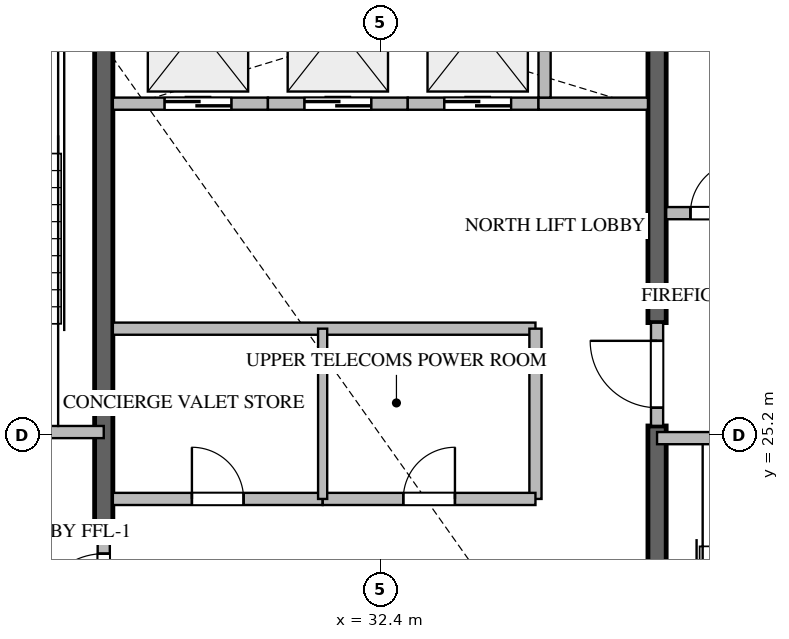
"""IFC4 building model, lengths in metres.
Left out: names, types, materials, properties, quantities, classifications, styles, units other than length and angle.
Written with IfcOpenShell. Run it as: python <this file> out.ifc"""

import sys

from ifc_helpers import new_model, si_unit, direction, frame, frame_2d, origin, place, context, subcontext, project, spatial, rectangle, extrude, source, transform, mapped, element, fill, save


model = new_model("IFC4")
c1 = context("Model", 3, precision=1e-05, world=origin(), true_north=direction((0.0, 1.0)))
c2 = subcontext(c1, "Body", "Model", "MODEL_VIEW")
j1 = project(units=[si_unit("LENGTHUNIT", "METRE"), si_unit("PLANEANGLEUNIT", "RADIAN")], contexts=[c1])
p1 = place(None, origin())
s1 = spatial("IfcSite", under=j1, at=p1, CompositionType="ELEMENT")
p2 = place(p1, origin())
s2 = spatial("IfcBuilding", under=s1, at=p2, CompositionType="ELEMENT")
p3 = place(p2, frame((0.0, 0.0, 225.85)))
s3 = spatial("IfcBuildingStorey", under=s2, at=p3, CompositionType="ELEMENT", Elevation=225.85)
p4 = place(p3, frame((27.85, 23.55, -0.26), z_axis=(0.0, 0.0, 1.0), x_axis=(0.0, 1.0, 0.0)))
e1 = element("IfcWall", 1, at=p4, inside=s3, PredefinedType="SHEAR", context=c2, shape_type="SweptSolid", body=[
    extrude(rectangle(XDim=9.875, YDim=0.3, at=frame_2d((4.938, 0.0))), origin(), (0.0, 0.0, 1.0), 3.848),
])
p5 = place(p3, frame((36.95, 16.975, -0.26), z_axis=(0.0, 0.0, 1.0), x_axis=(0.0, 1.0, 0.0)))
e2 = element("IfcWall", 2, at=p5, inside=s3, PredefinedType="SHEAR", context=c2, shape_type="SweptSolid", body=[
    extrude(rectangle(XDim=8.375, YDim=0.3, at=frame_2d((4.188, 0.0))), origin(), (0.0, 0.0, 1.0), 3.848),
])
p6 = place(p3, frame((36.95, 27.05, -0.26), z_axis=(0.0, 0.0, 1.0), x_axis=(0.0, 1.0, 0.0)))
e3 = element("IfcWall", 3, at=p6, inside=s3, PredefinedType="SHEAR", context=c2, shape_type="SweptSolid", body=[
    extrude(rectangle(XDim=6.375, YDim=0.3, at=frame_2d((3.188, 0.0))), origin(), (0.0, 0.0, 1.0), 3.848),
])
p7 = place(p3, frame((23.4, 25.25, 0.0), z_axis=(0.0, 0.0, 1.0), x_axis=(1.0, 0.0, 0.0)))
e4 = element("IfcWall", 4, at=p7, inside=s3, PredefinedType="STANDARD", context=c2, shape_type="SweptSolid", body=[
    extrude(rectangle(XDim=4.45, YDim=0.2, at=frame_2d((2.225, 0.0))), origin(), (0.0, 0.0, 1.0), 3.59),
])
p8 = place(p7, frame((1.65, 0.0, 0.0)))
e5 = element("IfcOpeningElement", 5, at=p8, cuts=e4, PredefinedType="OPENING", context=c2, shape_type="SweptSolid", body=[
    extrude(rectangle(XDim=1.1, YDim=2.15, at=frame_2d((0.55, 1.075))), frame((0.0, 0.11, 0.0), z_axis=(0.0, -1.0, 0.0), x_axis=(1.0, 0.0, 0.0)), (0.0, 0.0, 1.0), 0.22),
])
p9 = place(p3, frame((36.95, 25.15, 0.0), z_axis=(0.0, 0.0, 1.0), x_axis=(1.0, 0.0, 0.0)))
e6 = element("IfcWall", 6, at=p9, inside=s3, PredefinedType="STANDARD", context=c2, shape_type="SweptSolid", body=[
    extrude(rectangle(XDim=4.45, YDim=0.2, at=frame_2d((2.225, 0.0))), origin(), (0.0, 0.0, 1.0), 3.59),
])
p10 = place(p9, frame((1.65, 0.0, 0.0)))
e7 = element("IfcOpeningElement", 7, at=p10, cuts=e6, PredefinedType="OPENING", context=c2, shape_type="SweptSolid", body=[
    extrude(rectangle(XDim=1.1, YDim=2.15, at=frame_2d((0.55, 1.075))), frame((0.0, 0.11, 0.0), z_axis=(0.0, -1.0, 0.0), x_axis=(1.0, 0.0, 0.0)), (0.0, 0.0, 1.0), 0.22),
])
p11 = place(p3, frame((28.0, 30.65, 0.0), z_axis=(0.0, 0.0, 1.0), x_axis=(1.0, 0.0, 0.0)))
e8 = element("IfcWall", 8, at=p11, inside=s3, PredefinedType="STANDARD", context=c2, shape_type="SweptSolid", body=[
    extrude(rectangle(XDim=2.55, YDim=0.2, at=frame_2d((1.275, 0.0))), origin(), (0.0, 0.0, 1.0), 3.59),
])
p12 = place(p11, frame((0.85, 0.0, 0.0)))
e9 = element("IfcOpeningElement", 9, at=p12, cuts=e8, PredefinedType="OPENING", context=c2, shape_type="SweptSolid", body=[
    extrude(rectangle(XDim=1.1, YDim=2.2, at=frame_2d((0.55, 1.1))), frame((0.0, 0.11, 0.0), z_axis=(0.0, -1.0, 0.0), x_axis=(1.0, 0.0, 0.0)), (0.0, 0.0, 1.0), 0.22),
])
p13 = place(p3, frame((30.55, 30.65, 0.0), z_axis=(0.0, 0.0, 1.0), x_axis=(1.0, 0.0, 0.0)))
e10 = element("IfcWall", 10, at=p13, inside=s3, PredefinedType="STANDARD", context=c2, shape_type="SweptSolid", body=[
    extrude(rectangle(XDim=2.3, YDim=0.2, at=frame_2d((1.15, 0.0))), origin(), (0.0, 0.0, 1.0), 3.59),
])
p14 = place(p13, frame((0.6, 0.0, 0.0)))
e11 = element("IfcOpeningElement", 11, at=p14, cuts=e10, PredefinedType="OPENING", context=c2, shape_type="SweptSolid", body=[
    extrude(rectangle(XDim=1.1, YDim=2.2, at=frame_2d((0.55, 1.1))), frame((0.0, 0.11, 0.0), z_axis=(0.0, -1.0, 0.0), x_axis=(1.0, 0.0, 0.0)), (0.0, 0.0, 1.0), 0.22),
])
p15 = place(p3, frame((32.85, 30.65, 0.0), z_axis=(0.0, 0.0, 1.0), x_axis=(1.0, 0.0, 0.0)))
e12 = element("IfcWall", 12, at=p15, inside=s3, PredefinedType="STANDARD", context=c2, shape_type="SweptSolid", body=[
    extrude(rectangle(XDim=2.15, YDim=0.2, at=frame_2d((1.075, 0.0))), origin(), (0.0, 0.0, 1.0), 3.59),
])
p16 = place(p15, frame((0.6, 0.0, 0.0)))
e13 = element("IfcOpeningElement", 13, at=p16, cuts=e12, PredefinedType="OPENING", context=c2, shape_type="SweptSolid", body=[
    extrude(rectangle(XDim=1.1, YDim=2.2, at=frame_2d((0.55, 1.1))), frame((0.0, 0.11, 0.0), z_axis=(0.0, -1.0, 0.0), x_axis=(1.0, 0.0, 0.0)), (0.0, 0.0, 1.0), 0.22),
])
p17 = place(p3, frame((35.0, 30.65, 0.0), z_axis=(0.0, 0.0, 1.0), x_axis=(1.0, 0.0, 0.0)))
e14 = element("IfcWall", 14, at=p17, inside=s3, PredefinedType="STANDARD", context=c2, shape_type="SweptSolid", body=[
    extrude(rectangle(XDim=1.8, YDim=0.2, at=frame_2d((0.9, 0.0))), origin(), (0.0, 0.0, 1.0), 3.59),
])
p18 = place(p3, frame((35.1, 30.75, 0.0), z_axis=(0.0, 0.0, 1.0), x_axis=(0.0, 1.0, 0.0)))
e15 = element("IfcWall", 15, at=p18, inside=s3, PredefinedType="STANDARD", context=c2, shape_type="SweptSolid", body=[
    extrude(rectangle(XDim=2.675, YDim=0.2, at=frame_2d((1.337, 0.0))), origin(), (0.0, 0.0, 1.0), 3.59),
])
p19 = place(p3, frame((37.1, 28.85, 0.0), z_axis=(0.0, 0.0, 1.0), x_axis=(1.0, 0.0, 0.0)))
e16 = element("IfcWall", 16, at=p19, inside=s3, PredefinedType="STANDARD", context=c2, shape_type="SweptSolid", body=[
    extrude(rectangle(XDim=1.648, YDim=0.2, at=frame_2d((0.824, 0.0))), origin(), (0.0, 0.0, 1.0), 3.59),
])
p20 = place(p19, frame((0.399, 0.0, 0.0)))
e17 = element("IfcOpeningElement", 17, at=p20, cuts=e16, PredefinedType="OPENING", context=c2, shape_type="SweptSolid", body=[
    extrude(rectangle(XDim=0.85, YDim=2.1, at=frame_2d((0.425, 1.05))), frame((0.0, 0.11, 0.0), z_axis=(0.0, -1.0, 0.0), x_axis=(1.0, 0.0, 0.0)), (0.0, 0.0, 1.0), 0.22),
])
p21 = place(p3, frame((27.85, 21.852, 0.0), z_axis=(0.0, 0.0, 1.0), x_axis=(0.0, 1.0, 0.0)))
e18 = element("IfcWall", 18, at=p21, inside=s3, PredefinedType="STANDARD", context=c2, shape_type="SweptSolid", body=[
    extrude(rectangle(XDim=1.696, YDim=0.2, at=frame_2d((0.848, 0.0))), origin(), (0.0, 0.0, 1.0), 3.59),
])
p22 = place(p21, frame((0.298, 0.0, 0.0)))
e19 = element("IfcOpeningElement", 19, at=p22, cuts=e18, PredefinedType="OPENING", context=c2, shape_type="SweptSolid", body=[
    extrude(rectangle(XDim=1.1, YDim=2.15, at=frame_2d((0.55, 1.075))), frame((0.0, 0.11, 0.0), z_axis=(0.0, -1.0, 0.0), x_axis=(1.0, 0.0, 0.0)), (0.0, 0.0, 1.0), 0.22),
])
p23 = place(p3, frame((36.95, 25.352, 0.0), z_axis=(0.0, 0.0, 1.0), x_axis=(0.0, 1.0, 0.0)))
e20 = element("IfcWall", 20, at=p23, inside=s3, PredefinedType="STANDARD", context=c2, shape_type="SweptSolid", body=[
    extrude(rectangle(XDim=1.696, YDim=0.2, at=frame_2d((0.848, 0.0))), origin(), (0.0, 0.0, 1.0), 3.59),
])
p24 = place(p23, frame((0.298, 0.0, 0.0)))
e21 = element("IfcOpeningElement", 21, at=p24, cuts=e20, PredefinedType="OPENING", context=c2, shape_type="SweptSolid", body=[
    extrude(rectangle(XDim=1.1, YDim=2.15, at=frame_2d((0.55, 1.075))), frame((0.0, 0.11, 0.0), z_axis=(0.0, -1.0, 0.0), x_axis=(1.0, 0.0, 0.0)), (0.0, 0.0, 1.0), 0.22),
])
p25 = place(p3, frame((28.0, 26.95, 0.0), z_axis=(0.0, 0.0, 1.0), x_axis=(1.0, 0.0, 0.0)))
e22 = element("IfcWall", 22, at=p25, inside=s3, PredefinedType="STANDARD", context=c2, shape_type="SweptSolid", body=[
    extrude(rectangle(XDim=6.95, YDim=0.2, at=frame_2d((3.475, 0.0))), origin(), (0.0, 0.0, 1.0), 3.59),
])
p26 = place(p3, frame((34.95, 24.15, 0.0), z_axis=(0.0, 0.0, 1.0), x_axis=(0.0, 1.0, 0.0)))
e23 = element("IfcWall", 23, at=p26, inside=s3, PredefinedType="STANDARD", context=c2, shape_type="SweptSolid", body=[
    extrude(rectangle(XDim=2.8, YDim=0.2, at=frame_2d((1.4, 0.0))), origin(), (0.0, 0.0, 1.0), 3.59),
])
p27 = place(p3, frame((28.0, 24.15, 0.0), z_axis=(0.0, 0.0, 1.0), x_axis=(1.0, 0.0, 0.0)))
e24 = element("IfcWall", 24, at=p27, inside=s3, PredefinedType="STANDARD", context=c2, shape_type="SweptSolid", body=[
    extrude(rectangle(XDim=3.45, YDim=0.2, at=frame_2d((1.725, 0.0))), origin(), (0.0, 0.0, 1.0), 3.59),
])
p28 = place(p27, frame((1.3, 0.0, 0.0)))
e25 = element("IfcOpeningElement", 25, at=p28, cuts=e24, PredefinedType="OPENING", context=c2, shape_type="SweptSolid", body=[
    extrude(rectangle(XDim=0.85, YDim=2.1, at=frame_2d((0.425, 1.05))), frame((0.0, 0.11, 0.0), z_axis=(0.0, -1.0, 0.0), x_axis=(1.0, 0.0, 0.0)), (0.0, 0.0, 1.0), 0.22),
])
p29 = place(p3, frame((31.452, 24.15, 0.0), z_axis=(0.0, 0.0, 1.0), x_axis=(1.0, 0.0, 0.0)))
e26 = element("IfcWall", 26, at=p29, inside=s3, PredefinedType="STANDARD", context=c2, shape_type="SweptSolid", body=[
    extrude(rectangle(XDim=3.498, YDim=0.2, at=frame_2d((1.749, 0.0))), origin(), (0.0, 0.0, 1.0), 3.59),
])
p30 = place(p29, frame((1.324, 0.0, 0.0)))
e27 = element("IfcOpeningElement", 27, at=p30, cuts=e26, PredefinedType="OPENING", context=c2, shape_type="SweptSolid", body=[
    extrude(rectangle(XDim=0.85, YDim=2.1, at=frame_2d((0.425, 1.05))), frame((0.0, 0.11, 0.0), z_axis=(0.0, -1.0, 0.0), x_axis=(1.0, 0.0, 0.0)), (0.0, 0.0, 1.0), 0.22),
])
p31 = place(p3, frame((31.45, 24.15, 0.0), z_axis=(0.0, 0.0, 1.0), x_axis=(0.0, 1.0, 0.0)))
e28 = element("IfcWall", 28, at=p31, inside=s3, PredefinedType="PARTITIONING", context=c2, shape_type="SweptSolid", body=[
    extrude(rectangle(XDim=2.8, YDim=0.15, at=frame_2d((1.4, 0.0))), origin(), (0.0, 0.0, 1.0), 3.59),
])
m1 = source(origin(), c2, "Body", "SweptSolid", [
    extrude(rectangle(XDim=1.1, YDim=2.2, at=frame_2d((0.55, 1.1))), frame((0.0, 0.025, 0.0), z_axis=(0.0, -1.0, 0.0), x_axis=(1.0, 0.0, 0.0)), (0.0, 0.0, 1.0), 0.05),
])
p32 = place(p12, origin())
e29 = element("IfcDoor", 29, at=p32, inside=s3, OperationType="DOUBLE_DOOR_SLIDING", PredefinedType="DOOR", context=c2, shape_type="MappedRepresentation", body=[
    mapped(m1, transform((0.0, 0.0, 0.0), scale=1.0)),
])
fill(e9, e29)
p33 = place(p14, origin())
e30 = element("IfcDoor", 30, at=p33, inside=s3, OperationType="DOUBLE_DOOR_SLIDING", PredefinedType="DOOR", context=c2, shape_type="MappedRepresentation", body=[
    mapped(m1, transform((0.0, 0.0, 0.0), scale=1.0)),
])
fill(e11, e30)
p34 = place(p16, origin())
e31 = element("IfcDoor", 31, at=p34, inside=s3, OperationType="DOUBLE_DOOR_SLIDING", PredefinedType="DOOR", context=c2, shape_type="MappedRepresentation", body=[
    mapped(m1, transform((0.0, 0.0, 0.0), scale=1.0)),
])
fill(e13, e31)
m2 = source(origin(), c2, "Body", "SweptSolid", [
    extrude(rectangle(XDim=0.85, YDim=2.1, at=frame_2d((0.425, 1.05))), frame((0.0, 0.025, 0.0), z_axis=(0.0, -1.0, 0.0), x_axis=(1.0, 0.0, 0.0)), (0.0, 0.0, 1.0), 0.05),
])
p35 = place(p20, origin())
e32 = element("IfcDoor", 32, at=p35, inside=s3, OperationType="SINGLE_SWING_RIGHT", PredefinedType="DOOR", context=c2, shape_type="MappedRepresentation", body=[
    mapped(m2, transform((0.0, 0.0, 0.0), scale=1.0)),
])
fill(e17, e32)
m3 = source(origin(), c2, "Body", "SweptSolid", [
    extrude(rectangle(XDim=1.1, YDim=2.15, at=frame_2d((0.55, 1.075))), frame((0.0, 0.025, 0.0), z_axis=(0.0, -1.0, 0.0), x_axis=(1.0, 0.0, 0.0)), (0.0, 0.0, 1.0), 0.05),
])
p36 = place(p22, origin())
e33 = element("IfcDoor", 33, at=p36, inside=s3, OperationType="SINGLE_SWING_LEFT", PredefinedType="DOOR", context=c2, shape_type="MappedRepresentation", body=[
    mapped(m3, transform((0.0, 0.0, 0.0), scale=1.0)),
])
fill(e19, e33)
p37 = place(p24, origin())
e34 = element("IfcDoor", 34, at=p37, inside=s3, OperationType="SINGLE_SWING_RIGHT", PredefinedType="DOOR", context=c2, shape_type="MappedRepresentation", body=[
    mapped(m3, transform((0.0, 0.0, 0.0), scale=1.0)),
])
fill(e21, e34)
p38 = place(p28, origin())
e35 = element("IfcDoor", 35, at=p38, inside=s3, OperationType="SINGLE_SWING_LEFT", PredefinedType="DOOR", context=c2, shape_type="MappedRepresentation", body=[
    mapped(m2, transform((0.0, 0.0, 0.0), scale=1.0)),
])
fill(e25, e35)
p39 = place(p30, origin())
e36 = element("IfcDoor", 36, at=p39, inside=s3, OperationType="SINGLE_SWING_RIGHT", PredefinedType="DOOR", context=c2, shape_type="MappedRepresentation", body=[
    mapped(m2, transform((0.0, 0.0, 0.0), scale=1.0)),
])
fill(e27, e36)
save(model, sys.argv[1])
